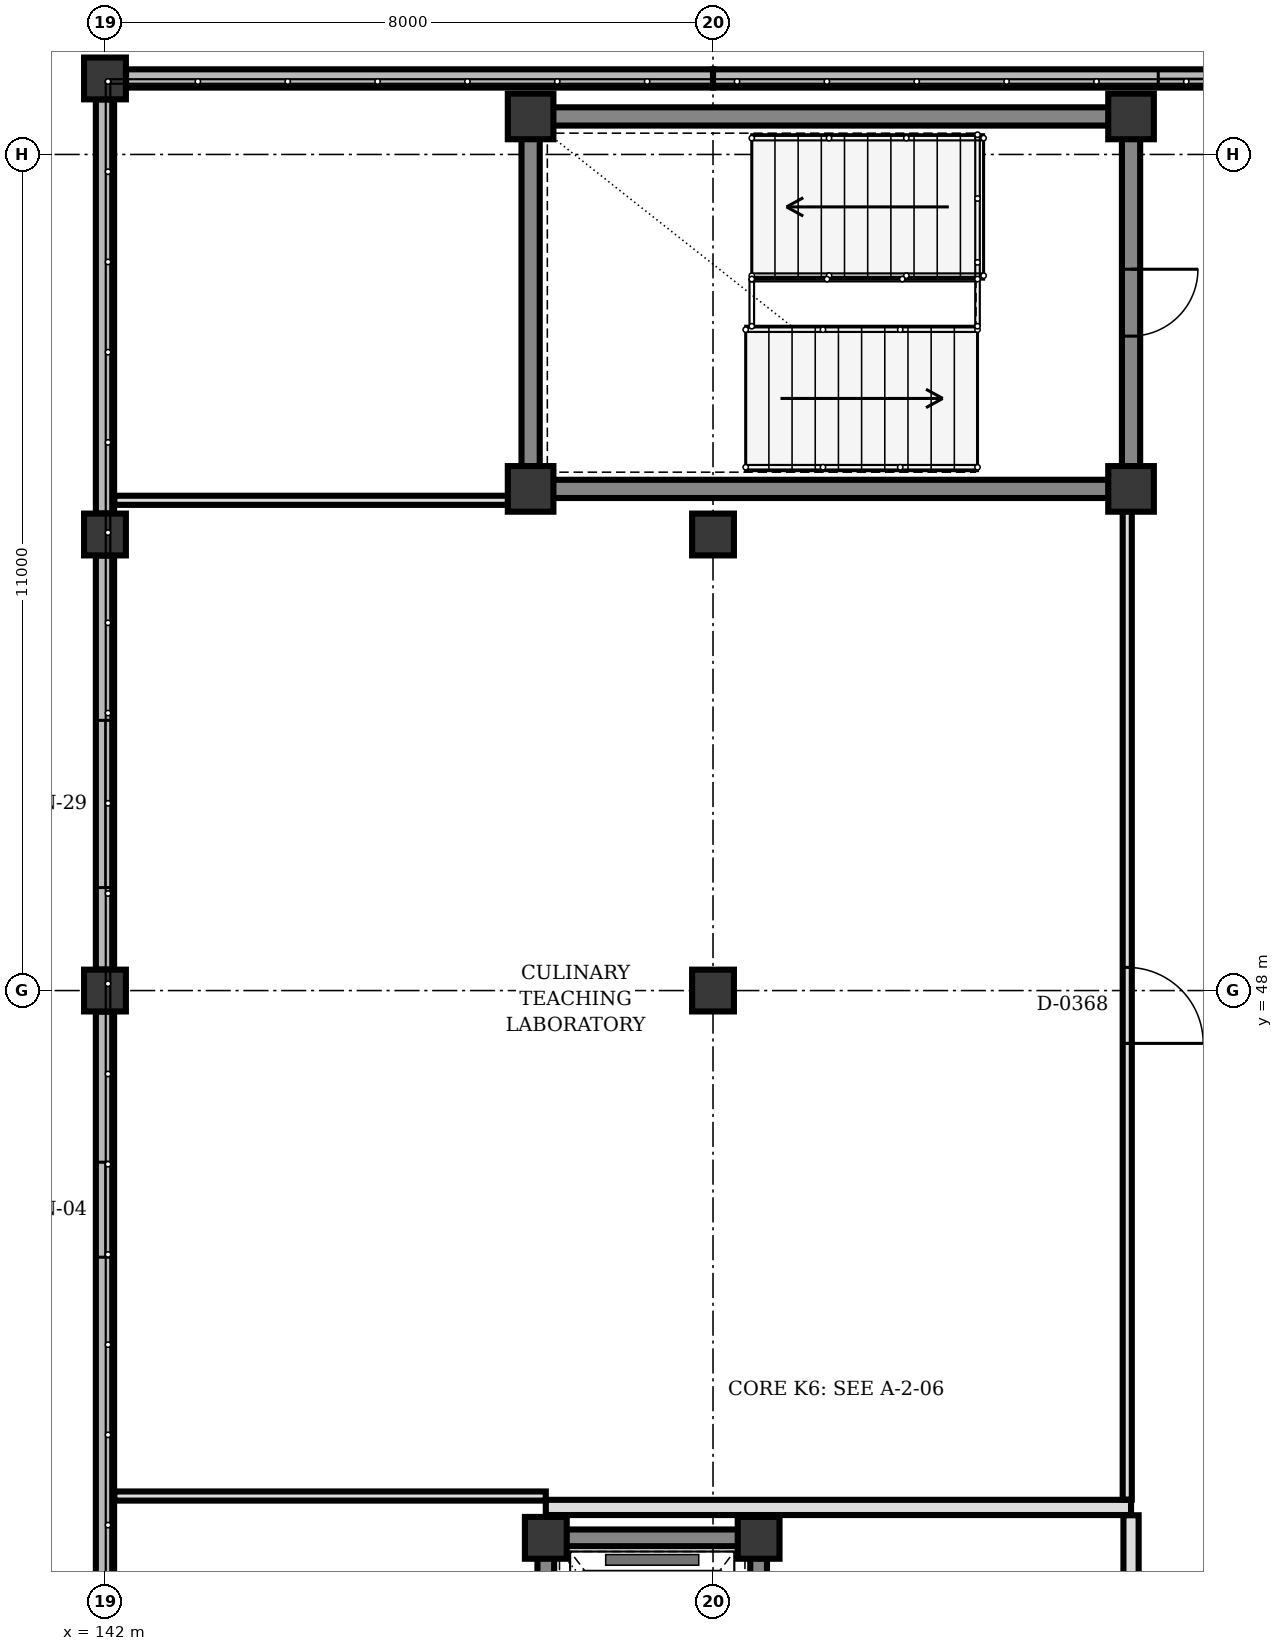
"""IFC4 building model, lengths in metres.
Left out: names, types, materials, properties, quantities, classifications, styles, units other than length and angle.
Written with IfcOpenShell. Run it as: python <this file> out.ifc"""

import sys

from ifc_helpers import new_model, si_unit, direction, frame, frame_2d, origin, origin_2d, place, context, subcontext, project, spatial, rectangle, extrude, element, fill, save


model = new_model("IFC4")
c1 = context("Model", 3, precision=1e-05, world=origin(), true_north=direction((0.0, 1.0)))
c2 = subcontext(c1, "Body", "Model", "MODEL_VIEW")
j1 = project(units=[si_unit("LENGTHUNIT", "METRE"), si_unit("PLANEANGLEUNIT", "RADIAN")], contexts=[c1])
p1 = place(None, origin())
s1 = spatial("IfcSite", under=j1, at=p1, CompositionType="ELEMENT")
p2 = place(p1, origin())
s2 = spatial("IfcBuilding", under=s1, at=p2, CompositionType="ELEMENT")
p3 = place(p2, frame((0.0, 0.0, 8.5)))
s3 = spatial("IfcBuildingStorey", under=s2, at=p3, CompositionType="ELEMENT", Elevation=8.5)
for number, where, z_axis, x_axis in (
    (1, (147.6, 54.6, 0.0), (0.0, 0.0, 1.0), (1.0, 0.0, 0.0)),
    (2, (155.5, 54.6, 0.0), (0.0, 0.0, 1.0), (1.0, 0.0, 0.0)),
    (3, (155.5, 59.5, 0.0), (0.0, 0.0, 1.0), (1.0, 0.0, 0.0)),
    (4, (147.6, 59.5, 0.0), (0.0, 0.0, 1.0), (1.0, 0.0, 0.0)),
):
    element("IfcColumn", number, at=place(p3, frame(where, z_axis=z_axis, x_axis=x_axis)), inside=s3, PredefinedType="COLUMN", context=c2, shape_type="SweptSolid", body=[
        extrude(rectangle(XDim=0.6, YDim=0.6, at=origin_2d()), origin(), (0.0, 0.0, 1.0), 4.0),
    ])
for number, where, z_axis, x_axis in (
    (5, (150.6, 40.8, 0.0), (0.0, 0.0, 1.0), (1.0, 0.0, 0.0)),
    (6, (147.8, 40.8, 0.0), (0.0, 0.0, 1.0), (1.0, 0.0, 0.0)),
    (7, (142.0, 48.0, 0.0), (0.0, 0.0, 1.0), (1.0, 0.0, 0.0)),
    (8, (142.0, 54.0, 0.0), (0.0, 0.0, 1.0), (1.0, 0.0, 0.0)),
    (9, (142.0, 60.0, 0.0), (0.0, 0.0, 1.0), (1.0, 0.0, 0.0)),
    (10, (150.0, 48.0, 0.0), (0.0, 0.0, 1.0), (1.0, 0.0, 0.0)),
    (11, (150.0, 54.0, 0.0), (0.0, 0.0, 1.0), (1.0, 0.0, 0.0)),
):
    element("IfcColumn", number, at=place(p3, frame(where, z_axis=z_axis, x_axis=x_axis)), inside=s3, PredefinedType="COLUMN", context=c2, shape_type="SweptSolid", body=[
        extrude(rectangle(XDim=0.55, YDim=0.55, at=origin_2d()), origin(), (0.0, 0.0, 1.0), 4.0),
    ])
p4 = place(p3, frame((142.0, 40.277, 0.0), z_axis=(0.0, 0.0, 1.0), x_axis=(0.0, 1.0, 0.0)))
e12 = element("IfcWall", 12, at=p4, inside=s3, PredefinedType="SOLIDWALL", context=c2, shape_type="SweptSolid", body=[
    extrude(rectangle(XDim=7.446, YDim=0.24, at=frame_2d((3.723, 0.0))), origin(), (0.0, 0.0, 1.0), 3.002),
])
p5 = place(p4, frame((4.215, 0.0, 0.9)))
e13 = element("IfcOpeningElement", 13, at=p5, cuts=e12, PredefinedType="OPENING", context=c2, shape_type="SweptSolid", body=[
    extrude(rectangle(XDim=1.25, YDim=1.1, at=frame_2d((0.625, 0.55))), frame((0.0, 0.13, 0.0), z_axis=(0.0, -1.0, 0.0), x_axis=(1.0, 0.0, 0.0)), (0.0, 0.0, 1.0), 0.26),
])
p6 = place(p3, frame((142.0, 48.277, 0.0), z_axis=(0.0, 0.0, 1.0), x_axis=(0.0, 1.0, 0.0)))
e14 = element("IfcWall", 14, at=p6, inside=s3, PredefinedType="SOLIDWALL", context=c2, shape_type="SweptSolid", body=[
    extrude(rectangle(XDim=5.446, YDim=0.24, at=frame_2d((2.723, 0.0))), origin(), (0.0, 0.0, 1.0), 3.002),
])
p7 = place(p6, frame((1.078, 0.0, 0.9)))
e15 = element("IfcOpeningElement", 15, at=p7, cuts=e14, PredefinedType="OPENING", context=c2, shape_type="SweptSolid", body=[
    extrude(rectangle(XDim=2.2, YDim=1.4, at=frame_2d((1.1, 0.7))), frame((0.0, 0.13, 0.0), z_axis=(0.0, -1.0, 0.0), x_axis=(1.0, 0.0, 0.0)), (0.0, 0.0, 1.0), 0.26),
])
p8 = place(p3, frame((142.0, 54.277, 0.0), z_axis=(0.0, 0.0, 1.0), x_axis=(0.0, 1.0, 0.0)))
e16 = element("IfcWall", 16, at=p8, inside=s3, PredefinedType="SOLIDWALL", context=c2, shape_type="SweptSolid", body=[
    extrude(rectangle(XDim=5.446, YDim=0.24, at=frame_2d((2.723, 0.0))), origin(), (0.0, 0.0, 1.0), 3.002),
])
p9 = place(p3, frame((142.277, 60.0, 0.0), z_axis=(0.0, 0.0, 1.0), x_axis=(1.0, 0.0, 0.0)))
e17 = element("IfcWall", 17, at=p9, inside=s3, PredefinedType="SOLIDWALL", context=c2, shape_type="SweptSolid", body=[
    extrude(rectangle(XDim=7.723, YDim=0.24, at=frame_2d((3.861, 0.0))), origin(), (0.0, 0.0, 1.0), 3.55),
])
p10 = place(p3, frame((150.0, 60.0, 0.0), z_axis=(0.0, 0.0, 1.0), x_axis=(1.0, 0.0, 0.0)))
e18 = element("IfcWall", 18, at=p10, inside=s3, PredefinedType="SOLIDWALL", context=c2, shape_type="SweptSolid", body=[
    extrude(rectangle(XDim=7.723, YDim=0.24, at=frame_2d((3.861, 0.0))), origin(), (0.0, 0.0, 1.0), 3.55),
])
p11 = place(p10, frame((5.858, 0.0, 0.9)))
e19 = element("IfcOpeningElement", 19, at=p11, cuts=e18, PredefinedType="OPENING", context=c2, shape_type="SweptSolid", body=[
    extrude(rectangle(XDim=0.95, YDim=1.1, at=frame_2d((0.475, 0.55))), frame((0.0, 0.13, 0.0), z_axis=(0.0, -1.0, 0.0), x_axis=(1.0, 0.0, 0.0)), (0.0, 0.0, 1.0), 0.26),
])
p12 = place(p3, frame((147.6, 54.892, 0.0), z_axis=(0.0, 0.0, 1.0), x_axis=(0.0, 1.0, 0.0)))
e20 = element("IfcWall", 20, at=p12, inside=s3, PredefinedType="SHEAR", context=c2, shape_type="SweptSolid", body=[
    extrude(rectangle(XDim=4.316, YDim=0.24, at=frame_2d((2.158, 0.0))), origin(), (0.0, 0.0, 1.0), 3.74),
])
p13 = place(p3, frame((155.5, 59.208, 0.0), z_axis=(0.0, 0.0, 1.0), x_axis=(0.0, -1.0, 0.0)))
e21 = element("IfcWall", 21, at=p13, inside=s3, PredefinedType="SHEAR", context=c2, shape_type="SweptSolid", body=[
    extrude(rectangle(XDim=4.316, YDim=0.24, at=frame_2d((2.158, 0.0))), origin(), (0.0, 0.0, 1.0), 3.74),
])
p14 = place(p13, frame((1.718, 0.0, 0.0)))
e22 = element("IfcOpeningElement", 22, at=p14, cuts=e21, PredefinedType="OPENING", context=c2, shape_type="SweptSolid", body=[
    extrude(rectangle(XDim=0.88, YDim=2.1, at=frame_2d((0.44, 1.05))), frame((0.0, 0.13, 0.0), z_axis=(0.0, -1.0, 0.0), x_axis=(1.0, 0.0, 0.0)), (0.0, 0.0, 1.0), 0.26),
])
for number, where, z_axis, x_axis in (
    (23, (155.208, 54.6, 0.0), (0.0, 0.0, 1.0), (-1.0, 0.0, 0.0)),
    (24, (155.208, 59.5, 0.0), (0.0, 0.0, 1.0), (-1.0, 0.0, 0.0)),
):
    element("IfcWall", number, at=place(p3, frame(where, z_axis=z_axis, x_axis=x_axis)), inside=s3, PredefinedType="SHEAR", context=c2, shape_type="SweptSolid", body=[
        extrude(rectangle(XDim=7.316, YDim=0.24, at=frame_2d((3.658, 0.0))), origin(), (0.0, 0.0, 1.0), 3.74),
    ])
p15 = place(p3, frame((150.6, 37.867, 0.0), z_axis=(0.0, 0.0, 1.0), x_axis=(0.0, 1.0, 0.0)))
e25 = element("IfcWall", 25, at=p15, inside=s3, PredefinedType="SHEAR", context=c2, shape_type="SweptSolid", body=[
    extrude(rectangle(XDim=2.666, YDim=0.22, at=frame_2d((1.333, 0.0))), origin(), (0.0, 0.0, 1.0), 3.74),
])
p16 = place(p15, frame((0.733, 0.0, 0.0)))
e26 = element("IfcOpeningElement", 26, at=p16, cuts=e25, PredefinedType="OPENING", context=c2, shape_type="SweptSolid", body=[
    extrude(rectangle(XDim=1.2, YDim=2.15, at=frame_2d((0.6, 1.075))), frame((0.0, 0.12, 0.0), z_axis=(0.0, -1.0, 0.0), x_axis=(1.0, 0.0, 0.0)), (0.0, 0.0, 1.0), 0.24),
])
p17 = place(p3, frame((150.333, 40.8, 0.0), z_axis=(0.0, 0.0, 1.0), x_axis=(-1.0, 0.0, 0.0)))
e27 = element("IfcWall", 27, at=p17, inside=s3, PredefinedType="SHEAR", context=c2, shape_type="SweptSolid", body=[
    extrude(rectangle(XDim=2.266, YDim=0.22, at=frame_2d((1.133, 0.0))), origin(), (0.0, 0.0, 1.0), 3.74),
])
p18 = place(p3, frame((147.8, 40.533, 0.0), z_axis=(0.0, 0.0, 1.0), x_axis=(0.0, -1.0, 0.0)))
e28 = element("IfcWall", 28, at=p18, inside=s3, PredefinedType="SHEAR", context=c2, shape_type="SweptSolid", body=[
    extrude(rectangle(XDim=2.666, YDim=0.22, at=frame_2d((1.333, 0.0))), origin(), (0.0, 0.0, 1.0), 3.74),
])
p19 = place(p3, frame((147.8, 41.2, 0.0), z_axis=(0.0, 0.0, 1.0), x_axis=(1.0, 0.0, 0.0)))
e29 = element("IfcWall", 29, at=p19, inside=s3, PredefinedType="PARTITIONING", context=c2, shape_type="SweptSolid", body=[
    extrude(rectangle(XDim=7.7, YDim=0.2, at=frame_2d((3.85, 0.0))), origin(), (0.0, 0.0, 1.0), 3.7),
])
p20 = place(p3, frame((155.5, 37.703, 0.0), z_axis=(0.0, 0.0, 1.0), x_axis=(0.0, 1.0, 0.0)))
e30 = element("IfcWall", 30, at=p20, inside=s3, PredefinedType="PARTITIONING", context=c2, shape_type="SweptSolid", body=[
    extrude(rectangle(XDim=3.394, YDim=0.2, at=frame_2d((1.697, 0.0))), origin(), (0.0, 0.0, 1.0), 3.7),
])
p21 = place(p20, frame((1.167, 0.0, 0.0)))
e31 = element("IfcOpeningElement", 31, at=p21, cuts=e30, PredefinedType="OPENING", context=c2, shape_type="SweptSolid", body=[
    extrude(rectangle(XDim=1.06, YDim=2.2, at=frame_2d((0.53, 1.1))), frame((0.0, 0.11, 0.0), z_axis=(0.0, -1.0, 0.0), x_axis=(1.0, 0.0, 0.0)), (0.0, 0.0, 1.0), 0.22),
])
p22 = place(p3, frame((142.123, 54.45, 0.0), z_axis=(0.0, 0.0, 1.0), x_axis=(1.0, 0.0, 0.0)))
e32 = element("IfcWall", 32, at=p22, inside=s3, PredefinedType="PARTITIONING", context=c2, shape_type="SweptSolid", body=[
    extrude(rectangle(XDim=5.185, YDim=0.12, at=frame_2d((2.593, 0.0))), origin(), (0.0, 0.0, 1.0), 3.152),
])
p23 = place(p3, frame((155.45, 54.308, 0.0), z_axis=(0.0, 0.0, 1.0), x_axis=(0.0, -1.0, 0.0)))
e33 = element("IfcWall", 33, at=p23, inside=s3, PredefinedType="PARTITIONING", context=c2, shape_type="SweptSolid", body=[
    extrude(rectangle(XDim=13.005, YDim=0.12, at=frame_2d((6.502, 0.0))), origin(), (0.0, 0.0, 1.0), 3.002),
])
p24 = place(p23, frame((6.003, 0.0, 0.0)))
e34 = element("IfcOpeningElement", 34, at=p24, cuts=e33, PredefinedType="OPENING", context=c2, shape_type="SweptSolid", body=[
    extrude(rectangle(XDim=1.0, YDim=2.1, at=frame_2d((0.5, 1.05))), frame((0.0, 0.07, 0.0), z_axis=(0.0, -1.0, 0.0), x_axis=(1.0, 0.0, 0.0)), (0.0, 0.0, 1.0), 0.14),
])
p25 = place(p3, frame((147.8, 41.35, 0.0), z_axis=(0.0, 0.0, 1.0), x_axis=(-1.0, 0.0, 0.0)))
e35 = element("IfcWall", 35, at=p25, inside=s3, PredefinedType="PARTITIONING", context=c2, shape_type="SweptSolid", body=[
    extrude(rectangle(XDim=5.677, YDim=0.12, at=frame_2d((2.838, 0.0))), origin(), (0.0, 0.0, 1.0), 3.152),
])
p26 = place(p5, origin())
e36 = element("IfcWindow", 36, at=p26, inside=s3, PartitioningType="SINGLE_PANEL", PredefinedType="WINDOW", context=c2, shape_type="SweptSolid", body=[
    extrude(rectangle(XDim=1.25, YDim=1.1, at=frame_2d((0.625, 0.55))), frame((0.0, 0.03, 0.0), z_axis=(0.0, -1.0, 0.0), x_axis=(1.0, 0.0, 0.0)), (0.0, 0.0, 1.0), 0.06),
])
fill(e13, e36)
p27 = place(p7, origin())
e37 = element("IfcWindow", 37, at=p27, inside=s3, PartitioningType="SINGLE_PANEL", PredefinedType="WINDOW", context=c2, shape_type="SweptSolid", body=[
    extrude(rectangle(XDim=2.2, YDim=1.4, at=frame_2d((1.1, 0.7))), frame((0.0, 0.03, 0.0), z_axis=(0.0, -1.0, 0.0), x_axis=(1.0, 0.0, 0.0)), (0.0, 0.0, 1.0), 0.06),
])
fill(e15, e37)
p28 = place(p11, origin())
e38 = element("IfcWindow", 38, at=p28, inside=s3, PartitioningType="SINGLE_PANEL", PredefinedType="WINDOW", context=c2, shape_type="SweptSolid", body=[
    extrude(rectangle(XDim=0.95, YDim=1.1, at=frame_2d((0.475, 0.55))), frame((0.0, 0.03, 0.0), z_axis=(0.0, -1.0, 0.0), x_axis=(1.0, 0.0, 0.0)), (0.0, 0.0, 1.0), 0.06),
])
fill(e19, e38)
p29 = place(p14, origin())
e39 = element("IfcDoor", 39, at=p29, inside=s3, OperationType="SINGLE_SWING_LEFT", PredefinedType="DOOR", context=c2, shape_type="SweptSolid", body=[
    extrude(rectangle(XDim=0.88, YDim=2.1, at=frame_2d((0.44, 1.05))), frame((0.0, 0.025, 0.0), z_axis=(0.0, -1.0, 0.0), x_axis=(1.0, 0.0, 0.0)), (0.0, 0.0, 1.0), 0.05),
])
fill(e22, e39)
p30 = place(p24, origin())
e40 = element("IfcDoor", 40, at=p30, inside=s3, OperationType="SINGLE_SWING_RIGHT", PredefinedType="DOOR", context=c2, shape_type="SweptSolid", body=[
    extrude(rectangle(XDim=1.0, YDim=2.1, at=frame_2d((0.5, 1.05))), frame((0.0, 0.025, 0.0), z_axis=(0.0, -1.0, 0.0), x_axis=(1.0, 0.0, 0.0)), (0.0, 0.0, 1.0), 0.05),
])
fill(e34, e40)
save(model, sys.argv[1])
